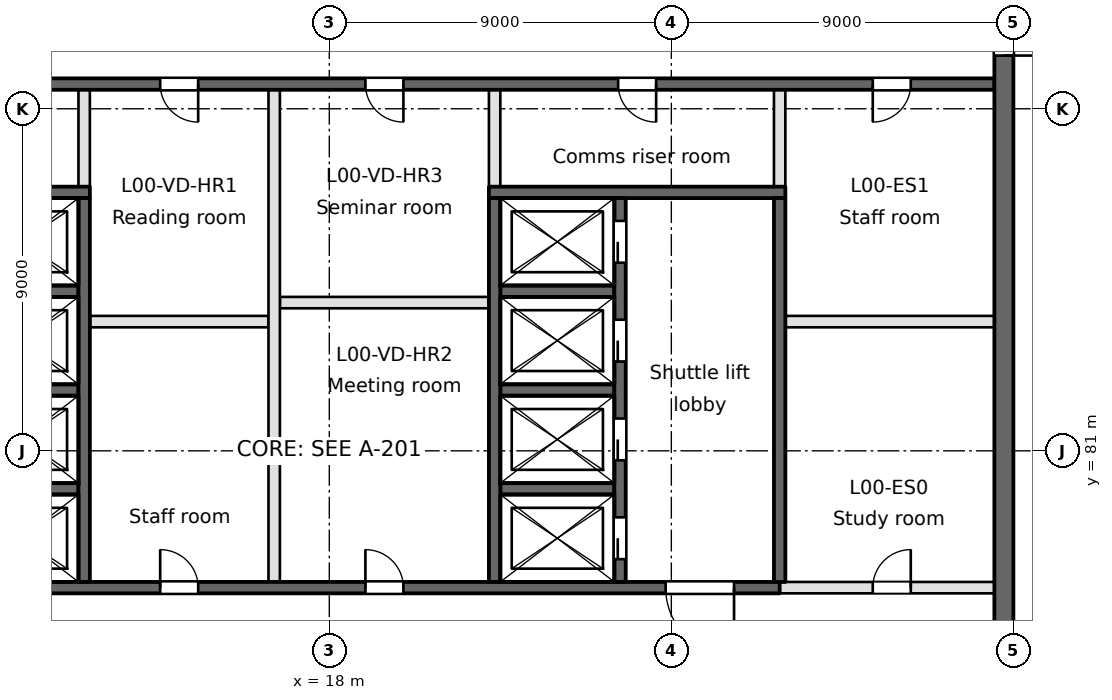
"""IFC4 building model, lengths in metres.
Left out: names, types, materials, properties, quantities, classifications, styles, units other than length and angle.
Written with IfcOpenShell. Run it as: python <this file> out.ifc"""

import sys

from ifc_helpers import new_model, si_unit, direction, frame, frame_2d, origin, place, context, subcontext, project, spatial, rectangle, extrude, element, fill, save


model = new_model("IFC4")
c1 = context("Model", 3, precision=1e-05, world=origin(), true_north=direction((0.0, 1.0)))
c2 = subcontext(c1, "Body", "Model", "MODEL_VIEW")
j1 = project(units=[si_unit("LENGTHUNIT", "METRE"), si_unit("PLANEANGLEUNIT", "RADIAN")], contexts=[c1])
p1 = place(None, origin())
s1 = spatial("IfcSite", under=j1, at=p1, CompositionType="ELEMENT")
p2 = place(p1, origin())
s2 = spatial("IfcBuilding", under=s1, at=p2, CompositionType="ELEMENT")
p3 = place(p2, origin())
s3 = spatial("IfcBuildingStorey", under=s2, at=p3, CompositionType="ELEMENT", Elevation=0.0)
p4 = place(p3, frame((0.9, 77.4, -0.4), z_axis=(0.0, 0.0, 1.0), x_axis=(1.0, 0.0, 0.0)))
e1 = element("IfcWall", 1, at=p4, inside=s3, PredefinedType="SOLIDWALL", context=c2, shape_type="SweptSolid", body=[
    extrude(rectangle(XDim=28.95, YDim=0.3, at=frame_2d((14.475, 0.0))), origin(), (0.0, 0.0, 1.0), 6.05),
])
p5 = place(p4, frame((4.35, 0.0, 0.4)))
e2 = element("IfcOpeningElement", 2, at=p5, cuts=e1, PredefinedType="OPENING", context=c2, shape_type="SweptSolid", body=[
    extrude(rectangle(XDim=1.8, YDim=2.1, at=frame_2d((0.9, 1.05))), frame((0.0, 0.15, 0.0), z_axis=(0.0, -1.0, 0.0), x_axis=(1.0, 0.0, 0.0)), (0.0, 0.0, 1.0), 0.3),
])
p6 = place(p4, frame((25.95, 0.0, 0.4)))
e3 = element("IfcOpeningElement", 3, at=p6, cuts=e1, PredefinedType="OPENING", context=c2, shape_type="SweptSolid", body=[
    extrude(rectangle(XDim=1.8, YDim=2.1, at=frame_2d((0.9, 1.05))), frame((0.0, 0.15, 0.0), z_axis=(0.0, -1.0, 0.0), x_axis=(1.0, 0.0, 0.0)), (0.0, 0.0, 1.0), 0.3),
])
p7 = place(p4, frame((12.65, 0.0, 0.4)))
e4 = element("IfcOpeningElement", 4, at=p7, cuts=e1, PredefinedType="OPENING", context=c2, shape_type="SweptSolid", body=[
    extrude(rectangle(XDim=1.0, YDim=2.1, at=frame_2d((0.5, 1.05))), frame((0.0, 0.15, 0.0), z_axis=(0.0, -1.0, 0.0), x_axis=(1.0, 0.0, 0.0)), (0.0, 0.0, 1.0), 0.3),
])
p8 = place(p4, frame((18.05, 0.0, 0.4)))
e5 = element("IfcOpeningElement", 5, at=p8, cuts=e1, PredefinedType="OPENING", context=c2, shape_type="SweptSolid", body=[
    extrude(rectangle(XDim=1.0, YDim=2.1, at=frame_2d((0.5, 1.05))), frame((0.0, 0.15, 0.0), z_axis=(0.0, -1.0, 0.0), x_axis=(1.0, 0.0, 0.0)), (0.0, 0.0, 1.0), 0.3),
])
p9 = place(p3, frame((29.85, 77.4, 0.0), z_axis=(0.0, 0.0, 1.0), x_axis=(1.0, 0.0, 0.0)))
e6 = element("IfcWall", 6, at=p9, inside=s3, PredefinedType="PARTITIONING", context=c2, shape_type="SweptSolid", body=[
    extrude(rectangle(XDim=5.65, YDim=0.3, at=frame_2d((2.825, 0.0))), origin(), (0.0, 0.0, 1.0), 5.65),
])
p10 = place(p9, frame((2.45, 0.0, 0.0)))
e7 = element("IfcOpeningElement", 7, at=p10, cuts=e6, PredefinedType="OPENING", context=c2, shape_type="SweptSolid", body=[
    extrude(rectangle(XDim=1.0, YDim=2.1, at=frame_2d((0.5, 1.05))), frame((0.0, 0.15, 0.0), z_axis=(0.0, -1.0, 0.0), x_axis=(1.0, 0.0, 0.0)), (0.0, 0.0, 1.0), 0.3),
])
for number, where, z_axis, x_axis in (
    (8, (8.4, 80.0, -0.4), (0.0, 0.0, 1.0), (1.0, 0.0, 0.0)),
    (9, (22.5, 80.0, -0.4), (0.0, 0.0, 1.0), (1.0, 0.0, 0.0)),
    (10, (8.4, 82.6, -0.4), (0.0, 0.0, 1.0), (1.0, 0.0, 0.0)),
    (11, (22.5, 82.6, -0.4), (0.0, 0.0, 1.0), (1.0, 0.0, 0.0)),
):
    element("IfcWall", number, at=place(p3, frame(where, z_axis=z_axis, x_axis=x_axis)), inside=s3, PredefinedType="SOLIDWALL", context=c2, shape_type="SweptSolid", body=[
        extrude(rectangle(XDim=3.0, YDim=0.3, at=frame_2d((1.5, 0.0))), origin(), (0.0, 0.0, 1.0), 6.05),
    ])
p11 = place(p3, frame((11.7, 84.4, 0.0), z_axis=(0.0, 0.0, 1.0), x_axis=(1.0, 0.0, 0.0)))
e12 = element("IfcWall", 12, at=p11, inside=s3, PredefinedType="PARTITIONING", context=c2, shape_type="SweptSolid", body=[
    extrude(rectangle(XDim=4.7, YDim=0.3, at=frame_2d((2.35, 0.0))), origin(), (0.0, 0.0, 1.0), 5.65),
])
for number, where, z_axis, x_axis in (
    (13, (30.0, 84.4, 0.0), (0.0, 0.0, 1.0), (1.0, 0.0, 0.0)),
    (14, (16.7, 84.9, 0.0), (0.0, 0.0, 1.0), (1.0, 0.0, 0.0)),
):
    element("IfcWall", number, at=place(p3, frame(where, z_axis=z_axis, x_axis=x_axis)), inside=s3, PredefinedType="PARTITIONING", context=c2, shape_type="SweptSolid", body=[
        extrude(rectangle(XDim=5.5, YDim=0.3, at=frame_2d((2.75, 0.0))), origin(), (0.0, 0.0, 1.0), 5.65),
    ])
for number, where, z_axis, x_axis in (
    (15, (8.4, 85.2, -0.4), (0.0, 0.0, 1.0), (1.0, 0.0, 0.0)),
    (16, (22.5, 85.2, -0.4), (0.0, 0.0, 1.0), (1.0, 0.0, 0.0)),
):
    element("IfcWall", number, at=place(p3, frame(where, z_axis=z_axis, x_axis=x_axis)), inside=s3, PredefinedType="SOLIDWALL", context=c2, shape_type="SweptSolid", body=[
        extrude(rectangle(XDim=3.0, YDim=0.3, at=frame_2d((1.5, 0.0))), origin(), (0.0, 0.0, 1.0), 6.05),
    ])
p12 = place(p3, frame((0.9, 87.8, -0.4), z_axis=(0.0, 0.0, 1.0), x_axis=(1.0, 0.0, 0.0)))
e17 = element("IfcWall", 17, at=p12, inside=s3, PredefinedType="SOLIDWALL", context=c2, shape_type="SweptSolid", body=[
    extrude(rectangle(XDim=10.8, YDim=0.3, at=frame_2d((5.4, 0.0))), origin(), (0.0, 0.0, 1.0), 6.05),
])
p13 = place(p3, frame((22.2, 87.8, -0.4), z_axis=(0.0, 0.0, 1.0), x_axis=(1.0, 0.0, 0.0)))
e18 = element("IfcWall", 18, at=p13, inside=s3, PredefinedType="SOLIDWALL", context=c2, shape_type="SweptSolid", body=[
    extrude(rectangle(XDim=7.8, YDim=0.3, at=frame_2d((3.9, 0.0))), origin(), (0.0, 0.0, 1.0), 6.05),
])
p14 = place(p3, frame((0.9, 90.65, -0.4), z_axis=(0.0, 0.0, 1.0), x_axis=(1.0, 0.0, 0.0)))
e19 = element("IfcWall", 19, at=p14, inside=s3, PredefinedType="SOLIDWALL", context=c2, shape_type="SweptSolid", body=[
    extrude(rectangle(XDim=34.6, YDim=0.3, at=frame_2d((17.3, 0.0))), origin(), (0.0, 0.0, 1.0), 6.05),
])
p15 = place(p14, frame((4.75, 0.0, 0.4)))
e20 = element("IfcOpeningElement", 20, at=p15, cuts=e19, PredefinedType="OPENING", context=c2, shape_type="SweptSolid", body=[
    extrude(rectangle(XDim=1.0, YDim=2.1, at=frame_2d((0.5, 1.05))), frame((0.0, 0.15, 0.0), z_axis=(0.0, -1.0, 0.0), x_axis=(1.0, 0.0, 0.0)), (0.0, 0.0, 1.0), 0.3),
])
p16 = place(p14, frame((24.7, 0.0, 0.4)))
e21 = element("IfcOpeningElement", 21, at=p16, cuts=e19, PredefinedType="OPENING", context=c2, shape_type="SweptSolid", body=[
    extrude(rectangle(XDim=1.0, YDim=2.1, at=frame_2d((0.5, 1.05))), frame((0.0, 0.15, 0.0), z_axis=(0.0, -1.0, 0.0), x_axis=(1.0, 0.0, 0.0)), (0.0, 0.0, 1.0), 0.3),
])
p17 = place(p14, frame((12.65, 0.0, 0.4)))
e22 = element("IfcOpeningElement", 22, at=p17, cuts=e19, PredefinedType="OPENING", context=c2, shape_type="SweptSolid", body=[
    extrude(rectangle(XDim=1.0, YDim=2.1, at=frame_2d((0.5, 1.05))), frame((0.0, 0.15, 0.0), z_axis=(0.0, -1.0, 0.0), x_axis=(1.0, 0.0, 0.0)), (0.0, 0.0, 1.0), 0.3),
])
p18 = place(p14, frame((18.05, 0.0, 0.4)))
e23 = element("IfcOpeningElement", 23, at=p18, cuts=e19, PredefinedType="OPENING", context=c2, shape_type="SweptSolid", body=[
    extrude(rectangle(XDim=1.0, YDim=2.1, at=frame_2d((0.5, 1.05))), frame((0.0, 0.15, 0.0), z_axis=(0.0, -1.0, 0.0), x_axis=(1.0, 0.0, 0.0)), (0.0, 0.0, 1.0), 0.3),
])
p19 = place(p14, frame((31.4, 0.0, 0.4)))
e24 = element("IfcOpeningElement", 24, at=p19, cuts=e19, PredefinedType="OPENING", context=c2, shape_type="SweptSolid", body=[
    extrude(rectangle(XDim=1.0, YDim=2.1, at=frame_2d((0.5, 1.05))), frame((0.0, 0.15, 0.0), z_axis=(0.0, -1.0, 0.0), x_axis=(1.0, 0.0, 0.0)), (0.0, 0.0, 1.0), 0.3),
])
p20 = place(p3, frame((11.55, 77.55, -0.4), z_axis=(0.0, 0.0, 1.0), x_axis=(0.0, 1.0, 0.0)))
e25 = element("IfcWall", 25, at=p20, inside=s3, PredefinedType="SOLIDWALL", context=c2, shape_type="SweptSolid", body=[
    extrude(rectangle(XDim=10.1, YDim=0.3, at=frame_2d((5.05, 0.0))), origin(), (0.0, 0.0, 1.0), 6.05),
])
p21 = place(p3, frame((11.55, 87.95, 0.0), z_axis=(0.0, 0.0, 1.0), x_axis=(0.0, 1.0, 0.0)))
e26 = element("IfcWall", 26, at=p21, inside=s3, PredefinedType="PARTITIONING", context=c2, shape_type="SweptSolid", body=[
    extrude(rectangle(XDim=2.55, YDim=0.3, at=frame_2d((1.275, 0.0))), origin(), (0.0, 0.0, 1.0), 5.65),
])
p22 = place(p3, frame((16.55, 77.55, 0.0), z_axis=(0.0, 0.0, 1.0), x_axis=(0.0, 1.0, 0.0)))
e27 = element("IfcWall", 27, at=p22, inside=s3, PredefinedType="PARTITIONING", context=c2, shape_type="SweptSolid", body=[
    extrude(rectangle(XDim=12.95, YDim=0.3, at=frame_2d((6.475, 0.0))), origin(), (0.0, 0.0, 1.0), 5.65),
])
p23 = place(p3, frame((22.35, 77.55, -0.4), z_axis=(0.0, 0.0, 1.0), x_axis=(0.0, 1.0, 0.0)))
e28 = element("IfcWall", 28, at=p23, inside=s3, PredefinedType="SOLIDWALL", context=c2, shape_type="SweptSolid", body=[
    extrude(rectangle(XDim=10.1, YDim=0.3, at=frame_2d((5.05, 0.0))), origin(), (0.0, 0.0, 1.0), 6.05),
])
p24 = place(p3, frame((22.35, 87.95, 0.0), z_axis=(0.0, 0.0, 1.0), x_axis=(0.0, 1.0, 0.0)))
e29 = element("IfcWall", 29, at=p24, inside=s3, PredefinedType="PARTITIONING", context=c2, shape_type="SweptSolid", body=[
    extrude(rectangle(XDim=2.55, YDim=0.3, at=frame_2d((1.275, 0.0))), origin(), (0.0, 0.0, 1.0), 5.65),
])
p25 = place(p3, frame((25.65, 77.55, -0.4), z_axis=(0.0, 0.0, 1.0), x_axis=(0.0, 1.0, 0.0)))
e30 = element("IfcWall", 30, at=p25, inside=s3, PredefinedType="SOLIDWALL", context=c2, shape_type="SweptSolid", body=[
    extrude(rectangle(XDim=10.1, YDim=0.3, at=frame_2d((5.05, 0.0))), origin(), (0.0, 0.0, 1.0), 6.05),
])
p26 = place(p25, frame((0.6, 0.0, 0.4)))
e31 = element("IfcOpeningElement", 31, at=p26, cuts=e30, PredefinedType="OPENING", context=c2, shape_type="SweptSolid", body=[
    extrude(rectangle(XDim=1.1, YDim=2.1, at=frame_2d((0.55, 1.05))), frame((0.0, 0.15, 0.0), z_axis=(0.0, -1.0, 0.0), x_axis=(1.0, 0.0, 0.0)), (0.0, 0.0, 1.0), 0.3),
])
p27 = place(p25, frame((3.2, 0.0, 0.4)))
e32 = element("IfcOpeningElement", 32, at=p27, cuts=e30, PredefinedType="OPENING", context=c2, shape_type="SweptSolid", body=[
    extrude(rectangle(XDim=1.1, YDim=2.1, at=frame_2d((0.55, 1.05))), frame((0.0, 0.15, 0.0), z_axis=(0.0, -1.0, 0.0), x_axis=(1.0, 0.0, 0.0)), (0.0, 0.0, 1.0), 0.3),
])
p28 = place(p25, frame((5.8, 0.0, 0.4)))
e33 = element("IfcOpeningElement", 33, at=p28, cuts=e30, PredefinedType="OPENING", context=c2, shape_type="SweptSolid", body=[
    extrude(rectangle(XDim=1.1, YDim=2.1, at=frame_2d((0.55, 1.05))), frame((0.0, 0.15, 0.0), z_axis=(0.0, -1.0, 0.0), x_axis=(1.0, 0.0, 0.0)), (0.0, 0.0, 1.0), 0.3),
])
p29 = place(p25, frame((8.4, 0.0, 0.4)))
e34 = element("IfcOpeningElement", 34, at=p29, cuts=e30, PredefinedType="OPENING", context=c2, shape_type="SweptSolid", body=[
    extrude(rectangle(XDim=1.1, YDim=2.1, at=frame_2d((0.55, 1.05))), frame((0.0, 0.15, 0.0), z_axis=(0.0, -1.0, 0.0), x_axis=(1.0, 0.0, 0.0)), (0.0, 0.0, 1.0), 0.3),
])
p30 = place(p3, frame((29.85, 77.55, -0.4), z_axis=(0.0, 0.0, 1.0), x_axis=(0.0, 1.0, 0.0)))
e35 = element("IfcWall", 35, at=p30, inside=s3, PredefinedType="SOLIDWALL", context=c2, shape_type="SweptSolid", body=[
    extrude(rectangle(XDim=10.1, YDim=0.3, at=frame_2d((5.05, 0.0))), origin(), (0.0, 0.0, 1.0), 6.05),
])
p31 = place(p3, frame((29.85, 87.95, 0.0), z_axis=(0.0, 0.0, 1.0), x_axis=(0.0, 1.0, 0.0)))
e36 = element("IfcWall", 36, at=p31, inside=s3, PredefinedType="PARTITIONING", context=c2, shape_type="SweptSolid", body=[
    extrude(rectangle(XDim=2.55, YDim=0.3, at=frame_2d((1.275, 0.0))), origin(), (0.0, 0.0, 1.0), 5.65),
])
p32 = place(p3, frame((35.75, 63.5, -0.4), z_axis=(0.0, 0.0, 1.0), x_axis=(0.0, 1.0, 0.0)))
e37 = element("IfcWall", 37, at=p32, inside=s3, PredefinedType="SOLIDWALL", context=c2, shape_type="SweptSolid", body=[
    extrude(rectangle(XDim=34.6, YDim=0.5, at=frame_2d((17.3, 0.0))), origin(), (0.0, 0.0, 1.0), 6.05),
])
p33 = place(p32, frame((9.7, 0.0, 0.4)))
e38 = element("IfcOpeningElement", 38, at=p33, cuts=e37, PredefinedType="OPENING", context=c2, shape_type="SweptSolid", body=[
    extrude(rectangle(XDim=2.4, YDim=2.1, at=frame_2d((1.2, 1.05))), frame((0.0, 0.25, 0.0), z_axis=(0.0, -1.0, 0.0), x_axis=(1.0, 0.0, 0.0)), (0.0, 0.0, 1.0), 0.5),
])
p34 = place(p32, frame((27.9, 0.0, 0.4)))
e39 = element("IfcOpeningElement", 39, at=p34, cuts=e37, PredefinedType="OPENING", context=c2, shape_type="SweptSolid", body=[
    extrude(rectangle(XDim=1.5, YDim=2.1, at=frame_2d((0.75, 1.05))), frame((0.0, 0.25, 0.0), z_axis=(0.0, -1.0, 0.0), x_axis=(1.0, 0.0, 0.0)), (0.0, 0.0, 1.0), 0.5),
])
p35 = place(p32, frame((1.5, 0.0, 0.4)))
e40 = element("IfcOpeningElement", 40, at=p35, cuts=e37, PredefinedType="OPENING", context=c2, shape_type="SweptSolid", body=[
    extrude(rectangle(XDim=1.2, YDim=2.1, at=frame_2d((0.6, 1.05))), frame((0.0, 0.25, 0.0), z_axis=(0.0, -1.0, 0.0), x_axis=(1.0, 0.0, 0.0)), (0.0, 0.0, 1.0), 0.5),
])
p36 = place(p26, origin())
e41 = element("IfcDoor", 41, at=p36, inside=s3, OperationType="SLIDING_TO_RIGHT", PredefinedType="DOOR", context=c2, shape_type="SweptSolid", body=[
    extrude(rectangle(XDim=1.1, YDim=2.1, at=frame_2d((0.55, 1.05))), frame((0.0, 0.025, 0.0), z_axis=(0.0, -1.0, 0.0), x_axis=(1.0, 0.0, 0.0)), (0.0, 0.0, 1.0), 0.05),
])
fill(e31, e41)
p37 = place(p27, origin())
e42 = element("IfcDoor", 42, at=p37, inside=s3, OperationType="SLIDING_TO_LEFT", PredefinedType="DOOR", context=c2, shape_type="SweptSolid", body=[
    extrude(rectangle(XDim=1.1, YDim=2.1, at=frame_2d((0.55, 1.05))), frame((0.0, 0.025, 0.0), z_axis=(0.0, -1.0, 0.0), x_axis=(1.0, 0.0, 0.0)), (0.0, 0.0, 1.0), 0.05),
])
fill(e32, e42)
p38 = place(p28, origin())
e43 = element("IfcDoor", 43, at=p38, inside=s3, OperationType="SLIDING_TO_RIGHT", PredefinedType="DOOR", context=c2, shape_type="SweptSolid", body=[
    extrude(rectangle(XDim=1.1, YDim=2.1, at=frame_2d((0.55, 1.05))), frame((0.0, 0.025, 0.0), z_axis=(0.0, -1.0, 0.0), x_axis=(1.0, 0.0, 0.0)), (0.0, 0.0, 1.0), 0.05),
])
fill(e33, e43)
p39 = place(p29, origin())
e44 = element("IfcDoor", 44, at=p39, inside=s3, OperationType="SLIDING_TO_LEFT", PredefinedType="DOOR", context=c2, shape_type="SweptSolid", body=[
    extrude(rectangle(XDim=1.1, YDim=2.1, at=frame_2d((0.55, 1.05))), frame((0.0, 0.025, 0.0), z_axis=(0.0, -1.0, 0.0), x_axis=(1.0, 0.0, 0.0)), (0.0, 0.0, 1.0), 0.05),
])
fill(e34, e44)
p40 = place(p6, frame((1.8, 0.0, 0.0), z_axis=(0.0, 0.0, 1.0), x_axis=(-1.0, 0.0, 0.0)))
e45 = element("IfcDoor", 45, at=p40, inside=s3, OperationType="SINGLE_SWING_LEFT", PredefinedType="DOOR", context=c2, shape_type="SweptSolid", body=[
    extrude(rectangle(XDim=1.8, YDim=2.1, at=frame_2d((0.9, 1.05))), frame((0.0, 0.025, 0.0), z_axis=(0.0, -1.0, 0.0), x_axis=(1.0, 0.0, 0.0)), (0.0, 0.0, 1.0), 0.05),
])
fill(e3, e45)
p41 = place(p34, frame((1.5, 0.0, 0.0), z_axis=(0.0, 0.0, 1.0), x_axis=(-1.0, 0.0, 0.0)))
e46 = element("IfcDoor", 46, at=p41, inside=s3, OperationType="SINGLE_SWING_RIGHT", PredefinedType="DOOR", context=c2, shape_type="SweptSolid", body=[
    extrude(rectangle(XDim=1.5, YDim=2.1, at=frame_2d((0.75, 1.05))), frame((0.0, 0.025, 0.0), z_axis=(0.0, -1.0, 0.0), x_axis=(1.0, 0.0, 0.0)), (0.0, 0.0, 1.0), 0.05),
])
fill(e39, e46)
p42 = place(p16, frame((1.0, 0.0, 0.0), z_axis=(0.0, 0.0, 1.0), x_axis=(-1.0, 0.0, 0.0)))
e47 = element("IfcDoor", 47, at=p42, inside=s3, OperationType="SINGLE_SWING_LEFT", PredefinedType="DOOR", context=c2, shape_type="SweptSolid", body=[
    extrude(rectangle(XDim=1.0, YDim=2.1, at=frame_2d((0.5, 1.05))), frame((0.0, 0.025, 0.0), z_axis=(0.0, -1.0, 0.0), x_axis=(1.0, 0.0, 0.0)), (0.0, 0.0, 1.0), 0.05),
])
fill(e21, e47)
p43 = place(p7, origin())
e48 = element("IfcDoor", 48, at=p43, inside=s3, OperationType="SINGLE_SWING_LEFT", PredefinedType="DOOR", context=c2, shape_type="SweptSolid", body=[
    extrude(rectangle(XDim=1.0, YDim=2.1, at=frame_2d((0.5, 1.05))), frame((0.0, 0.025, 0.0), z_axis=(0.0, -1.0, 0.0), x_axis=(1.0, 0.0, 0.0)), (0.0, 0.0, 1.0), 0.05),
])
fill(e4, e48)
p44 = place(p17, frame((1.0, 0.0, 0.0), z_axis=(0.0, 0.0, 1.0), x_axis=(-1.0, 0.0, 0.0)))
e49 = element("IfcDoor", 49, at=p44, inside=s3, OperationType="SINGLE_SWING_LEFT", PredefinedType="DOOR", context=c2, shape_type="SweptSolid", body=[
    extrude(rectangle(XDim=1.0, YDim=2.1, at=frame_2d((0.5, 1.05))), frame((0.0, 0.025, 0.0), z_axis=(0.0, -1.0, 0.0), x_axis=(1.0, 0.0, 0.0)), (0.0, 0.0, 1.0), 0.05),
])
fill(e22, e49)
p45 = place(p8, origin())
e50 = element("IfcDoor", 50, at=p45, inside=s3, OperationType="SINGLE_SWING_LEFT", PredefinedType="DOOR", context=c2, shape_type="SweptSolid", body=[
    extrude(rectangle(XDim=1.0, YDim=2.1, at=frame_2d((0.5, 1.05))), frame((0.0, 0.025, 0.0), z_axis=(0.0, -1.0, 0.0), x_axis=(1.0, 0.0, 0.0)), (0.0, 0.0, 1.0), 0.05),
])
fill(e5, e50)
p46 = place(p18, frame((1.0, 0.0, 0.0), z_axis=(0.0, 0.0, 1.0), x_axis=(-1.0, 0.0, 0.0)))
e51 = element("IfcDoor", 51, at=p46, inside=s3, OperationType="SINGLE_SWING_LEFT", PredefinedType="DOOR", context=c2, shape_type="SweptSolid", body=[
    extrude(rectangle(XDim=1.0, YDim=2.1, at=frame_2d((0.5, 1.05))), frame((0.0, 0.025, 0.0), z_axis=(0.0, -1.0, 0.0), x_axis=(1.0, 0.0, 0.0)), (0.0, 0.0, 1.0), 0.05),
])
fill(e23, e51)
p47 = place(p10, origin())
e52 = element("IfcDoor", 52, at=p47, inside=s3, OperationType="SINGLE_SWING_RIGHT", PredefinedType="DOOR", context=c2, shape_type="SweptSolid", body=[
    extrude(rectangle(XDim=1.0, YDim=2.1, at=frame_2d((0.5, 1.05))), frame((0.0, 0.025, 0.0), z_axis=(0.0, -1.0, 0.0), x_axis=(1.0, 0.0, 0.0)), (0.0, 0.0, 1.0), 0.05),
])
fill(e7, e52)
p48 = place(p19, frame((1.0, 0.0, 0.0), z_axis=(0.0, 0.0, 1.0), x_axis=(-1.0, 0.0, 0.0)))
e53 = element("IfcDoor", 53, at=p48, inside=s3, OperationType="SINGLE_SWING_RIGHT", PredefinedType="DOOR", context=c2, shape_type="SweptSolid", body=[
    extrude(rectangle(XDim=1.0, YDim=2.1, at=frame_2d((0.5, 1.05))), frame((0.0, 0.025, 0.0), z_axis=(0.0, -1.0, 0.0), x_axis=(1.0, 0.0, 0.0)), (0.0, 0.0, 1.0), 0.05),
])
fill(e24, e53)
save(model, sys.argv[1])
